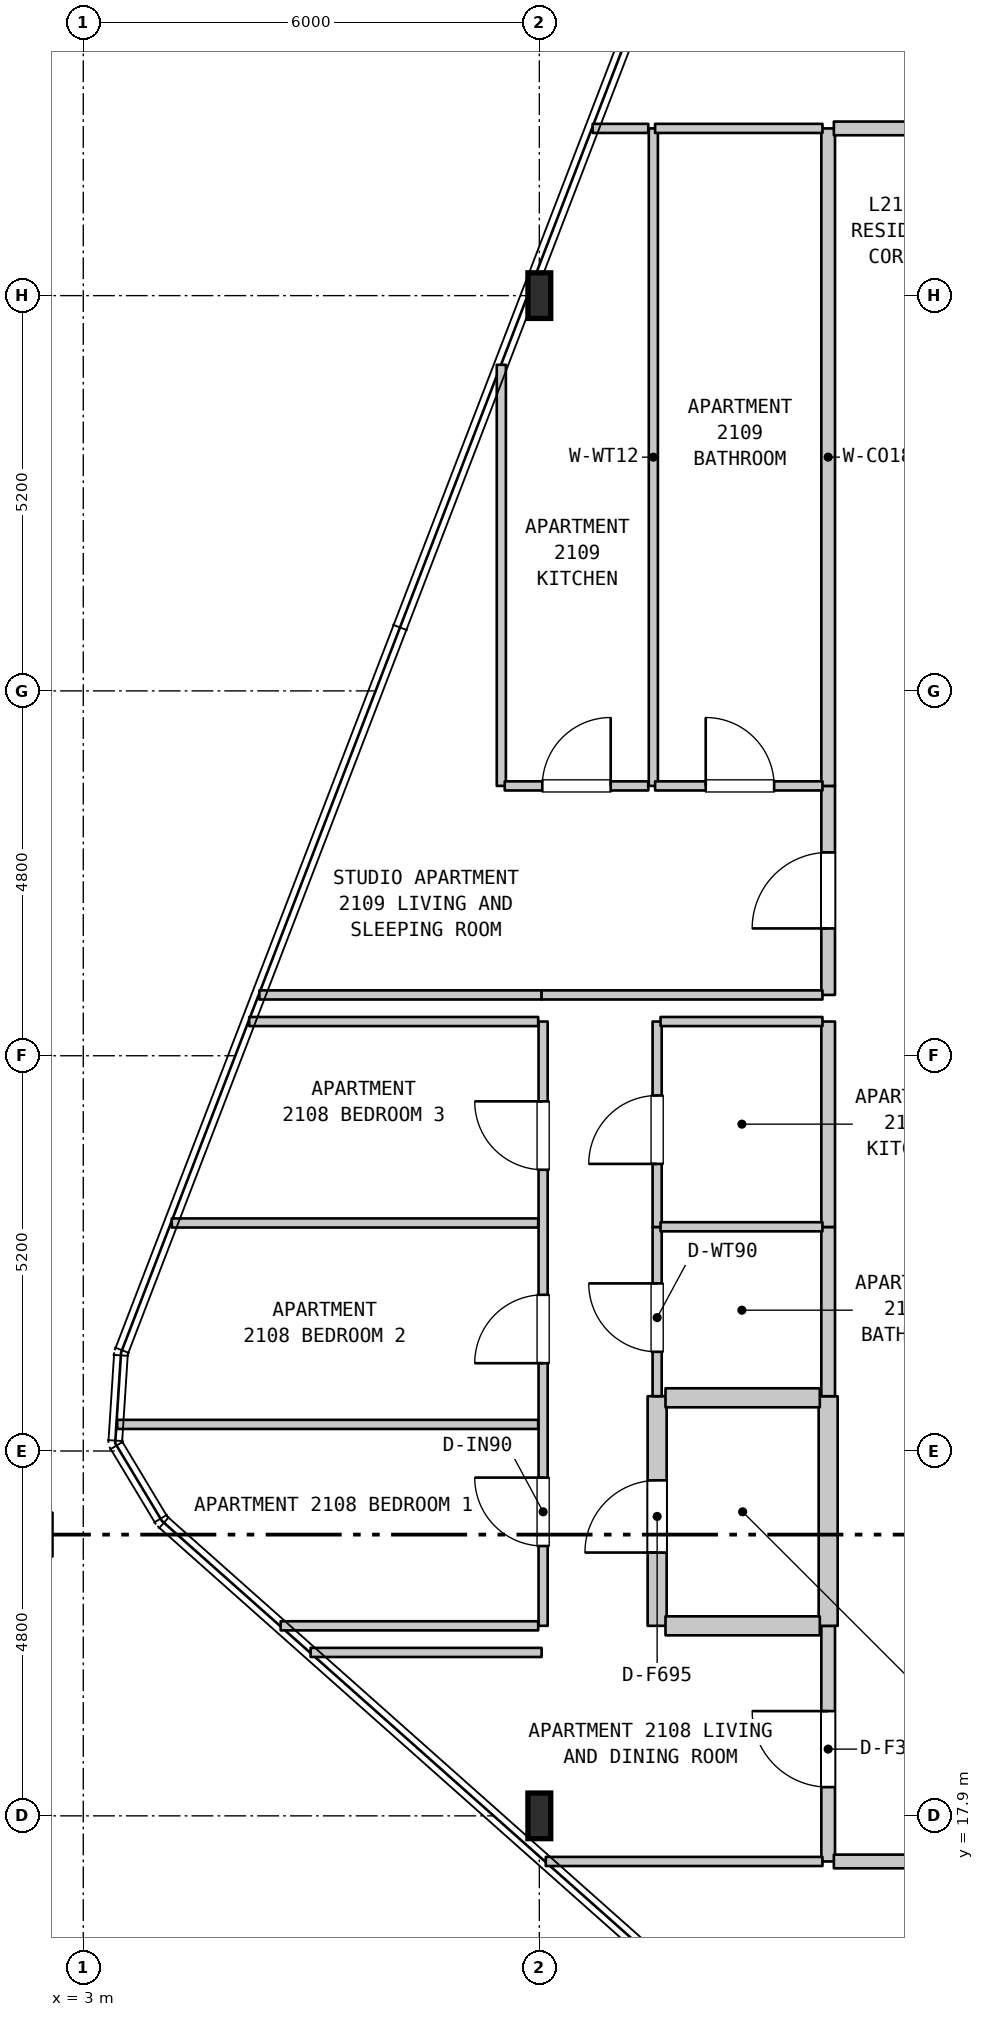
"""IFC4 building model, lengths in metres.
Left out: names, types, materials, properties, quantities, classifications, styles, units other than length and angle.
Written with IfcOpenShell. Run it as: python <this file> out.ifc"""

import sys

from ifc_helpers import new_model, si_unit, direction, frame, frame_2d, origin, origin_2d, place, context, subcontext, project, spatial, rectangle, i_section, extrude, element, fill, save


model = new_model("IFC4")
c1 = context("Model", 3, precision=1e-05, world=origin(), true_north=direction((0.0, 1.0)))
c2 = subcontext(c1, "Body", "Model", "MODEL_VIEW")
j1 = project(units=[si_unit("LENGTHUNIT", "METRE"), si_unit("PLANEANGLEUNIT", "RADIAN")], contexts=[c1])
p1 = place(None, origin())
s1 = spatial("IfcSite", under=j1, at=p1, CompositionType="ELEMENT")
p2 = place(p1, origin())
s2 = spatial("IfcBuilding", under=s1, at=p2, CompositionType="ELEMENT")
p3 = place(p2, frame((0.0, 0.0, 90.9)))
s3 = spatial("IfcBuildingStorey", under=s2, at=p3, CompositionType="ELEMENT", Elevation=90.9)
for number, where, z_axis, x_axis in (
    (1, (9.0, 17.9, 0.0), (0.0, 0.0, 1.0), (1.0, 0.0, 0.0)),
    (2, (9.0, 37.9, 0.0), (0.0, 0.0, 1.0), (1.0, 0.0, 0.0)),
):
    element("IfcColumn", number, at=place(p3, frame(where, z_axis=z_axis, x_axis=x_axis)), inside=s3, PredefinedType="COLUMN", context=c2, shape_type="SweptSolid", body=[
        extrude(i_section(OverallWidth=0.3, OverallDepth=0.6, WebThickness=0.015, FlangeThickness=0.03, FilletRadius=0.027, at=origin_2d()), origin(), (0.0, 0.0, 1.0), 3.7),
    ])
p4 = place(p3, frame((8.5, 31.45, 0.0), z_axis=(0.0, 0.0, 1.0), x_axis=(0.0, 1.0, 0.0)))
e3 = element("IfcWall", 3, at=p4, inside=s3, PredefinedType="PARTITIONING", context=c2, shape_type="SweptSolid", body=[
    extrude(rectangle(XDim=5.54, YDim=0.12, at=frame_2d((2.77, 0.0))), origin(), (0.0, 0.0, 1.0), 3.385),
])
p5 = place(p3, frame((9.05, 20.4, 0.0), z_axis=(0.0, 0.0, 1.0), x_axis=(0.0, 1.0, 0.0)))
e4 = element("IfcWall", 4, at=p5, inside=s3, PredefinedType="PARTITIONING", context=c2, shape_type="SweptSolid", body=[
    extrude(rectangle(XDim=7.95, YDim=0.12, at=frame_2d((3.975, 0.0))), origin(), (0.0, 0.0, 1.0), 2.785),
])
p6 = place(p5, frame((1.05, 0.0, 0.0)))
e5 = element("IfcOpeningElement", 5, at=p6, cuts=e4, PredefinedType="OPENING", context=c2, shape_type="SweptSolid", body=[
    extrude(rectangle(XDim=0.9, YDim=2.15, at=frame_2d((0.45, 1.075))), frame((0.0, 0.07, 0.0), z_axis=(0.0, -1.0, 0.0), x_axis=(1.0, 0.0, 0.0)), (0.0, 0.0, 1.0), 0.14),
])
p7 = place(p5, frame((3.455, 0.0, 0.0)))
e6 = element("IfcOpeningElement", 6, at=p7, cuts=e4, PredefinedType="OPENING", context=c2, shape_type="SweptSolid", body=[
    extrude(rectangle(XDim=0.9, YDim=2.15, at=frame_2d((0.45, 1.075))), frame((0.0, 0.07, 0.0), z_axis=(0.0, -1.0, 0.0), x_axis=(1.0, 0.0, 0.0)), (0.0, 0.0, 1.0), 0.14),
])
p8 = place(p5, frame((6.0, 0.0, 0.0)))
e7 = element("IfcOpeningElement", 7, at=p8, cuts=e4, PredefinedType="OPENING", context=c2, shape_type="SweptSolid", body=[
    extrude(rectangle(XDim=0.9, YDim=2.15, at=frame_2d((0.45, 1.075))), frame((0.0, 0.07, 0.0), z_axis=(0.0, -1.0, 0.0), x_axis=(1.0, 0.0, 0.0)), (0.0, 0.0, 1.0), 0.14),
])
p9 = place(p3, frame((10.5, 31.45, 0.0), z_axis=(0.0, 0.0, 1.0), x_axis=(0.0, 1.0, 0.0)))
e8 = element("IfcWall", 8, at=p9, inside=s3, PredefinedType="PARTITIONING", context=c2, shape_type="SweptSolid", body=[
    extrude(rectangle(XDim=8.65, YDim=0.12, at=frame_2d((4.325, 0.0))), origin(), (0.0, 0.0, 1.0), 3.385),
])
p10 = place(p3, frame((10.55, 20.4, 0.0), z_axis=(0.0, 0.0, 1.0), x_axis=(0.0, 1.0, 0.0)))
e9 = element("IfcWall", 9, at=p10, inside=s3, PredefinedType="STANDARD", context=c2, shape_type="SweptSolid", body=[
    extrude(rectangle(XDim=3.021, YDim=0.25, at=frame_2d((1.51, 0.0))), origin(), (0.0, 0.0, 1.0), 3.385),
])
p11 = place(p10, frame((0.964, 0.0, 0.0)))
e10 = element("IfcOpeningElement", 10, at=p11, cuts=e9, PredefinedType="OPENING", context=c2, shape_type="SweptSolid", body=[
    extrude(rectangle(XDim=0.95, YDim=2.15, at=frame_2d((0.475, 1.075))), frame((0.0, 0.135, 0.0), z_axis=(0.0, -1.0, 0.0), x_axis=(1.0, 0.0, 0.0)), (0.0, 0.0, 1.0), 0.27),
])
p12 = place(p3, frame((10.55, 23.421, 0.0), z_axis=(0.0, 0.0, 1.0), x_axis=(0.0, 1.0, 0.0)))
e11 = element("IfcWall", 11, at=p12, inside=s3, PredefinedType="PARTITIONING", context=c2, shape_type="SweptSolid", body=[
    extrude(rectangle(XDim=2.226, YDim=0.12, at=frame_2d((1.113, 0.0))), origin(), (0.0, 0.0, 1.0), 3.385),
])
p13 = place(p12, frame((0.584, 0.0, 0.0)))
e12 = element("IfcOpeningElement", 12, at=p13, cuts=e11, PredefinedType="OPENING", context=c2, shape_type="SweptSolid", body=[
    extrude(rectangle(XDim=0.9, YDim=2.1, at=frame_2d((0.45, 1.05))), frame((0.0, 0.07, 0.0), z_axis=(0.0, -1.0, 0.0), x_axis=(1.0, 0.0, 0.0)), (0.0, 0.0, 1.0), 0.14),
])
p14 = place(p3, frame((10.55, 25.647, 0.0), z_axis=(0.0, 0.0, 1.0), x_axis=(0.0, 1.0, 0.0)))
e13 = element("IfcWall", 13, at=p14, inside=s3, PredefinedType="PARTITIONING", context=c2, shape_type="SweptSolid", body=[
    extrude(rectangle(XDim=2.703, YDim=0.12, at=frame_2d((1.352, 0.0))), origin(), (0.0, 0.0, 1.0), 3.385),
])
p15 = place(p14, frame((0.83, 0.0, 0.0)))
e14 = element("IfcOpeningElement", 14, at=p15, cuts=e13, PredefinedType="OPENING", context=c2, shape_type="SweptSolid", body=[
    extrude(rectangle(XDim=0.9, YDim=2.15, at=frame_2d((0.45, 1.075))), frame((0.0, 0.07, 0.0), z_axis=(0.0, -1.0, 0.0), x_axis=(1.0, 0.0, 0.0)), (0.0, 0.0, 1.0), 0.14),
])
p16 = place(p3, frame((12.8, 17.3, 0.0), z_axis=(0.0, 0.0, 1.0), x_axis=(0.0, 1.0, 0.0)))
e15 = element("IfcWall", 15, at=p16, inside=s3, PredefinedType="STANDARD", context=c2, shape_type="SweptSolid", body=[
    extrude(rectangle(XDim=3.1, YDim=0.18, at=frame_2d((1.55, 0.0))), origin(), (0.0, 0.0, 1.0), 3.385),
])
p17 = place(p16, frame((0.978, 0.0, 0.0)))
e16 = element("IfcOpeningElement", 16, at=p17, cuts=e15, PredefinedType="OPENING", context=c2, shape_type="SweptSolid", body=[
    extrude(rectangle(XDim=1.0, YDim=2.15, at=frame_2d((0.5, 1.075))), frame((0.0, 0.1, 0.0), z_axis=(0.0, -1.0, 0.0), x_axis=(1.0, 0.0, 0.0)), (0.0, 0.0, 1.0), 0.2),
])
p18 = place(p3, frame((12.8, 20.4, 0.0), z_axis=(0.0, 0.0, 1.0), x_axis=(0.0, 1.0, 0.0)))
e17 = element("IfcWall", 17, at=p18, inside=s3, PredefinedType="STANDARD", context=c2, shape_type="SweptSolid", body=[
    extrude(rectangle(XDim=3.021, YDim=0.25, at=frame_2d((1.51, 0.0))), origin(), (0.0, 0.0, 1.0), 3.385),
])
p19 = place(p3, frame((12.8, 23.421, 0.0), z_axis=(0.0, 0.0, 1.0), x_axis=(0.0, 1.0, 0.0)))
e18 = element("IfcWall", 18, at=p19, inside=s3, PredefinedType="STANDARD", context=c2, shape_type="SweptSolid", body=[
    extrude(rectangle(XDim=2.226, YDim=0.18, at=frame_2d((1.113, 0.0))), origin(), (0.0, 0.0, 1.0), 3.385),
])
p20 = place(p3, frame((12.8, 25.647, 0.0), z_axis=(0.0, 0.0, 1.0), x_axis=(0.0, 1.0, 0.0)))
e19 = element("IfcWall", 19, at=p20, inside=s3, PredefinedType="STANDARD", context=c2, shape_type="SweptSolid", body=[
    extrude(rectangle(XDim=2.703, YDim=0.18, at=frame_2d((1.352, 0.0))), origin(), (0.0, 0.0, 1.0), 3.385),
])
p21 = place(p3, frame((12.8, 28.7, 0.0), z_axis=(0.0, 0.0, 1.0), x_axis=(0.0, 1.0, 0.0)))
e20 = element("IfcWall", 20, at=p21, inside=s3, PredefinedType="STANDARD", context=c2, shape_type="SweptSolid", body=[
    extrude(rectangle(XDim=2.75, YDim=0.18, at=frame_2d((1.375, 0.0))), origin(), (0.0, 0.0, 1.0), 3.385),
])
p22 = place(p21, frame((0.875, 0.0, 0.0)))
e21 = element("IfcOpeningElement", 21, at=p22, cuts=e20, PredefinedType="OPENING", context=c2, shape_type="SweptSolid", body=[
    extrude(rectangle(XDim=1.0, YDim=2.15, at=frame_2d((0.5, 1.075))), frame((0.0, 0.1, 0.0), z_axis=(0.0, -1.0, 0.0), x_axis=(1.0, 0.0, 0.0)), (0.0, 0.0, 1.0), 0.2),
])
p23 = place(p3, frame((12.8, 31.45, 0.0), z_axis=(0.0, 0.0, 1.0), x_axis=(0.0, 1.0, 0.0)))
e22 = element("IfcWall", 22, at=p23, inside=s3, PredefinedType="STANDARD", context=c2, shape_type="SweptSolid", body=[
    extrude(rectangle(XDim=8.65, YDim=0.18, at=frame_2d((4.325, 0.0))), origin(), (0.0, 0.0, 1.0), 3.385),
])
p24 = place(p3, frame((9.085, 17.3, 0.0), z_axis=(0.0, 0.0, 1.0), x_axis=(1.0, 0.0, 0.0)))
e23 = element("IfcWall", 23, at=p24, inside=s3, PredefinedType="PARTITIONING", context=c2, shape_type="SweptSolid", body=[
    extrude(rectangle(XDim=3.64, YDim=0.12, at=frame_2d((1.82, 0.0))), origin(), (0.0, 0.0, 1.0), 3.385),
])
p25 = place(p3, frame((12.875, 17.3, 0.0), z_axis=(0.0, 0.0, 1.0), x_axis=(1.0, 0.0, 0.0)))
e24 = element("IfcWall", 24, at=p25, inside=s3, PredefinedType="STANDARD", context=c2, shape_type="SweptSolid", body=[
    extrude(rectangle(XDim=7.35, YDim=0.18, at=frame_2d((3.675, 0.0))), origin(), (0.0, 0.0, 1.0), 3.385),
])
p26 = place(p25, frame((3.16, 0.0, 0.0)))
e25 = element("IfcOpeningElement", 25, at=p26, cuts=e24, PredefinedType="OPENING", context=c2, shape_type="SweptSolid", body=[
    extrude(rectangle(XDim=1.0, YDim=2.15, at=frame_2d((0.5, 1.075))), frame((0.0, 0.1, 0.0), z_axis=(0.0, -1.0, 0.0), x_axis=(1.0, 0.0, 0.0)), (0.0, 0.0, 1.0), 0.2),
])
p27 = place(p3, frame((5.991, 20.05, 0.0), z_axis=(0.0, 0.0, 1.0), x_axis=(1.0, 0.0, 0.0)))
e26 = element("IfcWall", 26, at=p27, inside=s3, PredefinedType="PARTITIONING", context=c2, shape_type="SweptSolid", body=[
    extrude(rectangle(XDim=3.039, YDim=0.12, at=frame_2d((1.52, 0.0))), origin(), (0.0, 0.0, 1.0), 3.385),
])
p28 = place(p3, frame((5.597, 20.4, 0.0), z_axis=(0.0, 0.0, 1.0), x_axis=(1.0, 0.0, 0.0)))
e27 = element("IfcWall", 27, at=p28, inside=s3, PredefinedType="PARTITIONING", context=c2, shape_type="SweptSolid", body=[
    extrude(rectangle(XDim=3.388, YDim=0.12, at=frame_2d((1.694, 0.0))), origin(), (0.0, 0.0, 1.0), 3.385),
])
p29 = place(p3, frame((10.66, 20.4, 0.0), z_axis=(0.0, 0.0, 1.0), x_axis=(1.0, 0.0, 0.0)))
e28 = element("IfcWall", 28, at=p29, inside=s3, PredefinedType="STANDARD", context=c2, shape_type="SweptSolid", body=[
    extrude(rectangle(XDim=2.03, YDim=0.25, at=frame_2d((1.015, 0.0))), origin(), (0.0, 0.0, 1.0), 3.385),
])
p30 = place(p3, frame((3.446, 23.05, 0.0), z_axis=(0.0, 0.0, 1.0), x_axis=(1.0, 0.0, 0.0)))
e29 = element("IfcWall", 29, at=p30, inside=s3, PredefinedType="PARTITIONING", context=c2, shape_type="SweptSolid", body=[
    extrude(rectangle(XDim=5.539, YDim=0.12, at=frame_2d((2.77, 0.0))), origin(), (0.0, 0.0, 1.0), 3.385),
])
p31 = place(p3, frame((10.66, 23.4, 0.0), z_axis=(0.0, 0.0, 1.0), x_axis=(1.0, 0.0, 0.0)))
e30 = element("IfcWall", 30, at=p31, inside=s3, PredefinedType="STANDARD", context=c2, shape_type="SweptSolid", body=[
    extrude(rectangle(XDim=2.03, YDim=0.25, at=frame_2d((1.015, 0.0))), origin(), (0.0, 0.0, 1.0), 3.385),
])
p32 = place(p3, frame((10.595, 25.65, 0.0), z_axis=(0.0, 0.0, 1.0), x_axis=(1.0, 0.0, 0.0)))
e31 = element("IfcWall", 31, at=p32, inside=s3, PredefinedType="PARTITIONING", context=c2, shape_type="SweptSolid", body=[
    extrude(rectangle(XDim=2.13, YDim=0.12, at=frame_2d((1.065, 0.0))), origin(), (0.0, 0.0, 1.0), 3.385),
])
p33 = place(p3, frame((4.164, 25.7, 0.0), z_axis=(0.0, 0.0, 1.0), x_axis=(1.0, 0.0, 0.0)))
e32 = element("IfcWall", 32, at=p33, inside=s3, PredefinedType="PARTITIONING", context=c2, shape_type="SweptSolid", body=[
    extrude(rectangle(XDim=4.821, YDim=0.12, at=frame_2d((2.411, 0.0))), origin(), (0.0, 0.0, 1.0), 3.385),
])
p34 = place(p3, frame((5.183, 28.35, 0.0), z_axis=(0.0, 0.0, 1.0), x_axis=(1.0, 0.0, 0.0)))
e33 = element("IfcWall", 33, at=p34, inside=s3, PredefinedType="PARTITIONING", context=c2, shape_type="SweptSolid", body=[
    extrude(rectangle(XDim=3.802, YDim=0.12, at=frame_2d((1.901, 0.0))), origin(), (0.0, 0.0, 1.0), 3.385),
])
p35 = place(p3, frame((10.595, 28.35, 0.0), z_axis=(0.0, 0.0, 1.0), x_axis=(1.0, 0.0, 0.0)))
e34 = element("IfcWall", 34, at=p35, inside=s3, PredefinedType="PARTITIONING", context=c2, shape_type="SweptSolid", body=[
    extrude(rectangle(XDim=2.13, YDim=0.12, at=frame_2d((1.065, 0.0))), origin(), (0.0, 0.0, 1.0), 3.385),
])
p36 = place(p3, frame((5.317, 28.7, 0.0), z_axis=(0.0, 0.0, 1.0), x_axis=(1.0, 0.0, 0.0)))
e35 = element("IfcWall", 35, at=p36, inside=s3, PredefinedType="PARTITIONING", context=c2, shape_type="SweptSolid", body=[
    extrude(rectangle(XDim=3.713, YDim=0.12, at=frame_2d((1.856, 0.0))), origin(), (0.0, 0.0, 1.0), 3.385),
])
p37 = place(p3, frame((9.03, 28.7, 0.0), z_axis=(0.0, 0.0, 1.0), x_axis=(1.0, 0.0, 0.0)))
e36 = element("IfcWall", 36, at=p37, inside=s3, PredefinedType="PARTITIONING", context=c2, shape_type="SweptSolid", body=[
    extrude(rectangle(XDim=3.695, YDim=0.12, at=frame_2d((1.848, 0.0))), origin(), (0.0, 0.0, 1.0), 3.385),
])
p38 = place(p3, frame((8.545, 31.45, 0.0), z_axis=(0.0, 0.0, 1.0), x_axis=(1.0, 0.0, 0.0)))
e37 = element("IfcWall", 37, at=p38, inside=s3, PredefinedType="PARTITIONING", context=c2, shape_type="SweptSolid", body=[
    extrude(rectangle(XDim=1.888, YDim=0.12, at=frame_2d((0.944, 0.0))), origin(), (0.0, 0.0, 1.0), 3.385),
])
p39 = place(p38, frame((0.494, 0.0, 0.0)))
e38 = element("IfcOpeningElement", 38, at=p39, cuts=e37, PredefinedType="OPENING", context=c2, shape_type="SweptSolid", body=[
    extrude(rectangle(XDim=0.9, YDim=2.15, at=frame_2d((0.45, 1.075))), frame((0.0, 0.07, 0.0), z_axis=(0.0, -1.0, 0.0), x_axis=(1.0, 0.0, 0.0)), (0.0, 0.0, 1.0), 0.14),
])
p40 = place(p3, frame((10.523, 31.45, 0.0), z_axis=(0.0, 0.0, 1.0), x_axis=(1.0, 0.0, 0.0)))
e39 = element("IfcWall", 39, at=p40, inside=s3, PredefinedType="PARTITIONING", context=c2, shape_type="SweptSolid", body=[
    extrude(rectangle(XDim=2.202, YDim=0.12, at=frame_2d((1.101, 0.0))), origin(), (0.0, 0.0, 1.0), 3.385),
])
p41 = place(p40, frame((0.666, 0.0, 0.0)))
e40 = element("IfcOpeningElement", 40, at=p41, cuts=e39, PredefinedType="OPENING", context=c2, shape_type="SweptSolid", body=[
    extrude(rectangle(XDim=0.9, YDim=2.1, at=frame_2d((0.45, 1.05))), frame((0.0, 0.07, 0.0), z_axis=(0.0, -1.0, 0.0), x_axis=(1.0, 0.0, 0.0)), (0.0, 0.0, 1.0), 0.14),
])
p42 = place(p3, frame((9.702, 40.1, 0.0), z_axis=(0.0, 0.0, 1.0), x_axis=(1.0, 0.0, 0.0)))
e41 = element("IfcWall", 41, at=p42, inside=s3, PredefinedType="PARTITIONING", context=c2, shape_type="SweptSolid", body=[
    extrude(rectangle(XDim=0.731, YDim=0.12, at=frame_2d((0.366, 0.0))), origin(), (0.0, 0.0, 1.0), 3.385),
])
p43 = place(p3, frame((10.523, 40.1, 0.0), z_axis=(0.0, 0.0, 1.0), x_axis=(1.0, 0.0, 0.0)))
e42 = element("IfcWall", 42, at=p43, inside=s3, PredefinedType="PARTITIONING", context=c2, shape_type="SweptSolid", body=[
    extrude(rectangle(XDim=2.202, YDim=0.12, at=frame_2d((1.101, 0.0))), origin(), (0.0, 0.0, 1.0), 3.385),
])
p44 = place(p3, frame((12.875, 40.1, 0.0), z_axis=(0.0, 0.0, 1.0), x_axis=(1.0, 0.0, 0.0)))
e43 = element("IfcWall", 43, at=p44, inside=s3, PredefinedType="STANDARD", context=c2, shape_type="SweptSolid", body=[
    extrude(rectangle(XDim=1.83, YDim=0.18, at=frame_2d((0.915, 0.0))), origin(), (0.0, 0.0, 1.0), 3.385),
])
p45 = place(p6, origin())
e44 = element("IfcDoor", 44, at=p45, inside=s3, OperationType="SINGLE_SWING_RIGHT", PredefinedType="DOOR", context=c2, shape_type="SweptSolid", body=[
    extrude(rectangle(XDim=0.9, YDim=2.15, at=frame_2d((0.45, 1.075))), frame((0.0, 0.025, 0.0), z_axis=(0.0, -1.0, 0.0), x_axis=(1.0, 0.0, 0.0)), (0.0, 0.0, 1.0), 0.05),
])
fill(e5, e44)
p46 = place(p7, origin())
e45 = element("IfcDoor", 45, at=p46, inside=s3, OperationType="SINGLE_SWING_LEFT", PredefinedType="DOOR", context=c2, shape_type="SweptSolid", body=[
    extrude(rectangle(XDim=0.9, YDim=2.15, at=frame_2d((0.45, 1.075))), frame((0.0, 0.025, 0.0), z_axis=(0.0, -1.0, 0.0), x_axis=(1.0, 0.0, 0.0)), (0.0, 0.0, 1.0), 0.05),
])
fill(e6, e45)
p47 = place(p8, origin())
e46 = element("IfcDoor", 46, at=p47, inside=s3, OperationType="SINGLE_SWING_RIGHT", PredefinedType="DOOR", context=c2, shape_type="SweptSolid", body=[
    extrude(rectangle(XDim=0.9, YDim=2.15, at=frame_2d((0.45, 1.075))), frame((0.0, 0.025, 0.0), z_axis=(0.0, -1.0, 0.0), x_axis=(1.0, 0.0, 0.0)), (0.0, 0.0, 1.0), 0.05),
])
fill(e7, e46)
p48 = place(p11, origin())
e47 = element("IfcDoor", 47, at=p48, inside=s3, OperationType="SINGLE_SWING_LEFT", PredefinedType="DOOR", context=c2, shape_type="SweptSolid", body=[
    extrude(rectangle(XDim=0.95, YDim=2.15, at=frame_2d((0.475, 1.075))), frame((0.0, 0.025, 0.0), z_axis=(0.0, -1.0, 0.0), x_axis=(1.0, 0.0, 0.0)), (0.0, 0.0, 1.0), 0.05),
])
fill(e10, e47)
p49 = place(p13, origin())
e48 = element("IfcDoor", 48, at=p49, inside=s3, OperationType="SINGLE_SWING_RIGHT", PredefinedType="DOOR", context=c2, shape_type="SweptSolid", body=[
    extrude(rectangle(XDim=0.9, YDim=2.1, at=frame_2d((0.45, 1.05))), frame((0.0, 0.025, 0.0), z_axis=(0.0, -1.0, 0.0), x_axis=(1.0, 0.0, 0.0)), (0.0, 0.0, 1.0), 0.05),
])
fill(e12, e48)
p50 = place(p15, origin())
e49 = element("IfcDoor", 49, at=p50, inside=s3, OperationType="SINGLE_SWING_LEFT", PredefinedType="DOOR", context=c2, shape_type="SweptSolid", body=[
    extrude(rectangle(XDim=0.9, YDim=2.15, at=frame_2d((0.45, 1.075))), frame((0.0, 0.025, 0.0), z_axis=(0.0, -1.0, 0.0), x_axis=(1.0, 0.0, 0.0)), (0.0, 0.0, 1.0), 0.05),
])
fill(e14, e49)
p51 = place(p17, origin())
e50 = element("IfcDoor", 50, at=p51, inside=s3, OperationType="SINGLE_SWING_RIGHT", PredefinedType="DOOR", context=c2, shape_type="SweptSolid", body=[
    extrude(rectangle(XDim=1.0, YDim=2.15, at=frame_2d((0.5, 1.075))), frame((0.0, 0.025, 0.0), z_axis=(0.0, -1.0, 0.0), x_axis=(1.0, 0.0, 0.0)), (0.0, 0.0, 1.0), 0.05),
])
fill(e16, e50)
p52 = place(p22, origin())
e51 = element("IfcDoor", 51, at=p52, inside=s3, OperationType="SINGLE_SWING_LEFT", PredefinedType="DOOR", context=c2, shape_type="SweptSolid", body=[
    extrude(rectangle(XDim=1.0, YDim=2.15, at=frame_2d((0.5, 1.075))), frame((0.0, 0.025, 0.0), z_axis=(0.0, -1.0, 0.0), x_axis=(1.0, 0.0, 0.0)), (0.0, 0.0, 1.0), 0.05),
])
fill(e21, e51)
p53 = place(p39, origin())
e52 = element("IfcDoor", 52, at=p53, inside=s3, OperationType="SINGLE_SWING_RIGHT", PredefinedType="DOOR", context=c2, shape_type="SweptSolid", body=[
    extrude(rectangle(XDim=0.9, YDim=2.15, at=frame_2d((0.45, 1.075))), frame((0.0, 0.025, 0.0), z_axis=(0.0, -1.0, 0.0), x_axis=(1.0, 0.0, 0.0)), (0.0, 0.0, 1.0), 0.05),
])
fill(e38, e52)
p54 = place(p41, origin())
e53 = element("IfcDoor", 53, at=p54, inside=s3, OperationType="SINGLE_SWING_LEFT", PredefinedType="DOOR", context=c2, shape_type="SweptSolid", body=[
    extrude(rectangle(XDim=0.9, YDim=2.1, at=frame_2d((0.45, 1.05))), frame((0.0, 0.025, 0.0), z_axis=(0.0, -1.0, 0.0), x_axis=(1.0, 0.0, 0.0)), (0.0, 0.0, 1.0), 0.05),
])
fill(e40, e53)
save(model, sys.argv[1])
